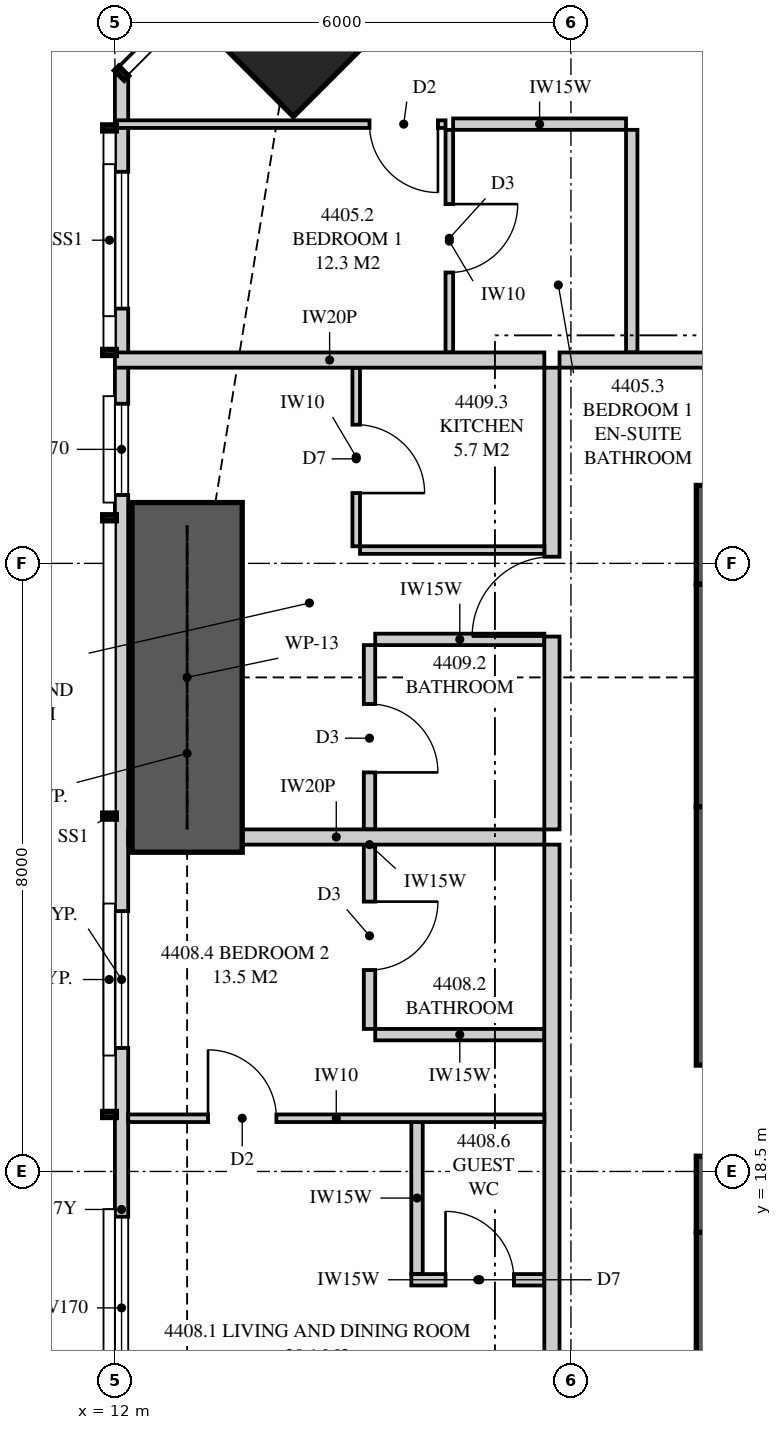
"""IFC4 building model, lengths in metres.
Left out: names, types, materials, properties, quantities, classifications, styles, units other than length and angle.
Written with IfcOpenShell. Run it as: python <this file> out.ifc"""

import sys

from ifc_helpers import new_model, si_unit, direction, frame, frame_2d, origin, origin_2d, place, context, subcontext, project, spatial, polyline, rectangle, outline, extrude, element, fill, save


model = new_model("IFC4")
c1 = context("Model", 3, precision=1e-05, world=origin(), true_north=direction((0.0, 1.0)))
c2 = subcontext(c1, "Body", "Model", "MODEL_VIEW")
j1 = project(units=[si_unit("LENGTHUNIT", "METRE"), si_unit("PLANEANGLEUNIT", "RADIAN")], contexts=[c1])
p1 = place(None, origin())
s1 = spatial("IfcSite", under=j1, at=p1, CompositionType="ELEMENT")
p2 = place(p1, origin())
s2 = spatial("IfcBuilding", under=s1, at=p2, CompositionType="ELEMENT")
p3 = place(p2, frame((0.0, 0.0, 164.4)))
s3 = spatial("IfcBuildingStorey", under=s2, at=p3, CompositionType="ELEMENT", Elevation=164.4)
p4 = place(p3, frame((14.348, 33.652, 0.0), z_axis=(0.0, 0.0, 1.0), x_axis=(0.707106781187, 0.707106781187, 0.0)))
e1 = element("IfcColumn", 1, at=p4, inside=s3, PredefinedType="COLUMN", context=c2, shape_type="SweptSolid", body=[
    extrude(rectangle(XDim=1.8, YDim=1.8, at=origin_2d()), origin(), (0.0, 0.0, 1.0), 3.35),
])
p5 = place(p3, frame((26.0, 26.875, 0.0), z_axis=(0.0, 0.0, 1.0), x_axis=(-1.0, 0.0, 0.0)))
e2 = element("IfcWall", 2, at=p5, inside=s3, PredefinedType="SHEAR", context=c2, shape_type="SweptSolid", body=[
    extrude(rectangle(XDim=6.35, YDim=1.3, at=frame_2d((3.175, 0.0))), origin(), (0.0, 0.0, 1.0), 3.35),
])
p6 = place(p5, frame((0.825, 0.0, 0.0)))
e3 = element("IfcOpeningElement", 3, at=p6, cuts=e2, PredefinedType="OPENING", context=c2, shape_type="SweptSolid", body=[
    extrude(rectangle(XDim=0.75, YDim=2.1, at=frame_2d((0.375, 1.05))), frame((0.0, 0.66, 0.0), z_axis=(0.0, -1.0, 0.0), x_axis=(1.0, 0.0, 0.0)), (0.0, 0.0, 1.0), 1.32),
])
p7 = place(p3, frame((20.0, 26.225, 0.0), z_axis=(0.0, 0.0, 1.0), x_axis=(0.0, -1.0, 0.0)))
e4 = element("IfcWall", 4, at=p7, inside=s3, PredefinedType="SHEAR", context=c2, shape_type="SweptSolid", body=[
    extrude(rectangle(XDim=2.925, YDim=0.7, at=frame_2d((1.462, 0.0))), origin(), (0.0, 0.0, 1.0), 3.35),
])
p8 = place(p3, frame((20.0, 23.3, 0.0), z_axis=(0.0, 0.0, 1.0), x_axis=(0.0, -1.0, 0.0)))
e5 = element("IfcWall", 5, at=p8, inside=s3, PredefinedType="SHEAR", context=c2, shape_type="SweptSolid", body=[
    extrude(rectangle(XDim=5.6, YDim=0.7, at=frame_2d((2.8, 0.0))), origin(), (0.0, 0.0, 1.0), 3.35),
])
p9 = place(p8, frame((3.4, 0.0, 0.0)))
e6 = element("IfcOpeningElement", 6, at=p9, cuts=e5, PredefinedType="OPENING", context=c2, shape_type="SweptSolid", body=[
    extrude(rectangle(XDim=1.2, YDim=2.2, at=frame_2d((0.6, 1.1))), frame((0.0, 0.36, 0.0), z_axis=(0.0, -1.0, 0.0), x_axis=(1.0, 0.0, 0.0)), (0.0, 0.0, 1.0), 0.72),
])
p10 = place(p3, frame((20.0, 17.7, 0.0), z_axis=(0.0, 0.0, 1.0), x_axis=(0.0, -1.0, 0.0)))
e7 = element("IfcWall", 7, at=p10, inside=s3, PredefinedType="SHEAR", context=c2, shape_type="SweptSolid", body=[
    extrude(rectangle(XDim=4.7, YDim=0.7, at=frame_2d((2.35, 0.0))), origin(), (0.0, 0.0, 1.0), 3.35),
])
p11 = place(p3, frame((12.087, 32.949, 0.0), z_axis=(0.0, 0.0, 1.0), x_axis=(0.0, -1.0, 0.0)))
e8 = element("IfcWall", 8, at=p11, inside=s3, PredefinedType="SOLIDWALL", context=c2, shape_type="SweptSolid", body=[
    extrude(outline(polyline([(0.0, 0.0), (29.897, 0.0), (29.897, 3.11), (20.191, 3.11), (20.191, 2.15), (20.051, 2.15), (20.051, 3.11), (19.949, 3.11), (19.949, 2.15), (7.949, 2.15), (7.949, 3.11), (7.823, 3.11), (7.823, 2.15), (7.73, 2.15), (7.73, 3.11), (0.0, 3.11), (0.0, 0.0)])), frame((0.0, 0.087, 0.0), z_axis=(0.0, -1.0, 0.0), x_axis=(1.0, 0.0, 0.0)), (0.0, 0.0, 1.0), 0.175),
])
p12 = place(p11, frame((1.297, 0.0, 0.4)))
e9 = element("IfcOpeningElement", 9, at=p12, cuts=e8, PredefinedType="OPENING", context=c2, shape_type="SweptSolid", body=[
    extrude(rectangle(XDim=1.8, YDim=1.7, at=frame_2d((0.9, 0.85))), frame((0.0, 0.097, 0.0), z_axis=(0.0, -1.0, 0.0), x_axis=(1.0, 0.0, 0.0)), (0.0, 0.0, 1.0), 0.195),
])
p13 = place(p11, frame((4.349, 0.0, 0.4)))
e10 = element("IfcOpeningElement", 10, at=p13, cuts=e8, PredefinedType="OPENING", context=c2, shape_type="SweptSolid", body=[
    extrude(rectangle(XDim=1.2, YDim=1.7, at=frame_2d((0.6, 0.85))), frame((0.0, 0.097, 0.0), z_axis=(0.0, -1.0, 0.0), x_axis=(1.0, 0.0, 0.0)), (0.0, 0.0, 1.0), 0.195),
])
p14 = place(p11, frame((11.024, 0.0, 0.4)))
e11 = element("IfcOpeningElement", 11, at=p14, cuts=e8, PredefinedType="OPENING", context=c2, shape_type="SweptSolid", body=[
    extrude(rectangle(XDim=1.8, YDim=1.7, at=frame_2d((0.9, 0.85))), frame((0.0, 0.097, 0.0), z_axis=(0.0, -1.0, 0.0), x_axis=(1.0, 0.0, 0.0)), (0.0, 0.0, 1.0), 0.195),
])
p15 = place(p11, frame((15.044, 0.0, 0.4)))
e12 = element("IfcOpeningElement", 12, at=p15, cuts=e8, PredefinedType="OPENING", context=c2, shape_type="SweptSolid", body=[
    extrude(rectangle(XDim=2.4, YDim=1.7, at=frame_2d((1.2, 0.85))), frame((0.0, 0.097, 0.0), z_axis=(0.0, -1.0, 0.0), x_axis=(1.0, 0.0, 0.0)), (0.0, 0.0, 1.0), 0.195),
])
p16 = place(p11, frame((22.624, 0.0, 0.0)))
e13 = element("IfcOpeningElement", 13, at=p16, cuts=e8, PredefinedType="OPENING", context=c2, shape_type="SweptSolid", body=[
    extrude(rectangle(XDim=1.8, YDim=2.1, at=frame_2d((0.9, 1.05))), frame((0.0, 0.097, 0.0), z_axis=(0.0, -1.0, 0.0), x_axis=(1.0, 0.0, 0.0)), (0.0, 0.0, 1.0), 0.195),
])
p17 = place(p11, frame((26.301, 0.0, 0.4)))
e14 = element("IfcOpeningElement", 14, at=p17, cuts=e8, PredefinedType="OPENING", context=c2, shape_type="SweptSolid", body=[
    extrude(rectangle(XDim=1.8, YDim=1.7, at=frame_2d((0.9, 0.85))), frame((0.0, 0.097, 0.0), z_axis=(0.0, -1.0, 0.0), x_axis=(1.0, 0.0, 0.0)), (0.0, 0.0, 1.0), 0.195),
])
p18 = place(p3, frame((17.85, 29.175, 0.0), z_axis=(0.0, 0.0, 1.0), x_axis=(1.0, 0.0, 0.0)))
e15 = element("IfcWall", 15, at=p18, inside=s3, PredefinedType="PARTITIONING", context=c2, shape_type="SweptSolid", body=[
    extrude(outline(polyline([(0.0, 0.0), (5.75, 0.0), (5.75, 3.11), (4.737, 3.11), (4.737, 2.541), (4.062, 2.541), (4.062, 3.11), (0.0, 3.11), (0.0, 0.0)])), frame((0.0, 0.1, 0.0), z_axis=(0.0, -1.0, 0.0), x_axis=(1.0, 0.0, 0.0)), (0.0, 0.0, 1.0), 0.2),
])
p19 = place(p18, frame((2.35, 0.0, 0.0)))
e16 = element("IfcOpeningElement", 16, at=p19, cuts=e15, PredefinedType="OPENING", context=c2, shape_type="SweptSolid", body=[
    extrude(rectangle(XDim=1.05, YDim=2.2, at=frame_2d((0.525, 1.1))), frame((0.0, 0.11, 0.0), z_axis=(0.0, -1.0, 0.0), x_axis=(1.0, 0.0, 0.0)), (0.0, 0.0, 1.0), 0.22),
])
p20 = place(p3, frame((16.4, 32.204, 0.0), z_axis=(0.0, 0.0, 1.0), x_axis=(0.0, -1.0, 0.0)))
e17 = element("IfcWall", 17, at=p20, inside=s3, PredefinedType="PARTITIONING", context=c2, shape_type="SweptSolid", body=[
    extrude(rectangle(XDim=2.929, YDim=0.1, at=frame_2d((1.464, 0.0))), origin(), (0.0, 0.0, 1.0), 3.11),
])
p21 = place(p20, frame((0.977, 0.0, 0.0)))
e18 = element("IfcOpeningElement", 18, at=p21, cuts=e17, PredefinedType="OPENING", context=c2, shape_type="SweptSolid", body=[
    extrude(rectangle(XDim=0.9, YDim=2.1, at=frame_2d((0.45, 1.05))), frame((0.0, 0.06, 0.0), z_axis=(0.0, -1.0, 0.0), x_axis=(1.0, 0.0, 0.0)), (0.0, 0.0, 1.0), 0.12),
])
p22 = place(p3, frame((16.35, 32.279, 0.0), z_axis=(0.0, 0.0, 1.0), x_axis=(-1.0, 0.0, 0.0)))
e19 = element("IfcWall", 19, at=p22, inside=s3, PredefinedType="PARTITIONING", context=c2, shape_type="SweptSolid", body=[
    extrude(outline(polyline([(0.0, 0.0), (4.35, 0.0), (4.35, 3.11), (3.094, 3.11), (3.094, 2.15), (1.352, 2.15), (1.352, 3.11), (0.0, 3.11), (0.0, 0.0)])), frame((0.0, 0.05, 0.0), z_axis=(0.0, -1.0, 0.0), x_axis=(1.0, 0.0, 0.0)), (0.0, 0.0, 1.0), 0.1),
])
p23 = place(p22, frame((0.1, 0.0, 0.0)))
e20 = element("IfcOpeningElement", 20, at=p23, cuts=e19, PredefinedType="OPENING", context=c2, shape_type="SweptSolid", body=[
    extrude(rectangle(XDim=0.9, YDim=2.1, at=frame_2d((0.45, 1.05))), frame((0.0, 0.06, 0.0), z_axis=(0.0, -1.0, 0.0), x_axis=(1.0, 0.0, 0.0)), (0.0, 0.0, 1.0), 0.12),
])
p24 = place(p3, frame((18.725, 32.279, 0.0), z_axis=(0.0, 0.0, 1.0), x_axis=(-1.0, 0.0, 0.0)))
e21 = element("IfcWall", 21, at=p24, inside=s3, PredefinedType="PLUMBINGWALL", context=c2, shape_type="SweptSolid", body=[
    extrude(rectangle(XDim=2.275, YDim=0.15, at=frame_2d((1.138, 0.0))), origin(), (0.0, 0.0, 1.0), 3.11),
])
p25 = place(p3, frame((18.8, 32.204, 0.0), z_axis=(0.0, 0.0, 1.0), x_axis=(0.0, -1.0, 0.0)))
e22 = element("IfcWall", 22, at=p25, inside=s3, PredefinedType="PLUMBINGWALL", context=c2, shape_type="SweptSolid", body=[
    extrude(rectangle(XDim=2.929, YDim=0.15, at=frame_2d((1.464, 0.0))), origin(), (0.0, 0.0, 1.0), 3.11),
])
p26 = place(p3, frame((12.0, 29.175, 0.0), z_axis=(0.0, 0.0, 1.0), x_axis=(1.0, 0.0, 0.0)))
e23 = element("IfcWall", 23, at=p26, inside=s3, PredefinedType="PARTITIONING", context=c2, shape_type="SweptSolid", body=[
    extrude(outline(polyline([(0.0, 0.0), (5.65, 0.0), (5.65, 3.11), (2.547, 3.11), (2.547, 2.15), (0.703, 2.15), (0.703, 3.11), (0.0, 3.11), (0.0, 0.0)])), frame((0.0, 0.1, 0.0), z_axis=(0.0, -1.0, 0.0), x_axis=(1.0, 0.0, 0.0)), (0.0, 0.0, 1.0), 0.2),
])
p27 = place(p3, frame((12.175, 22.9, 0.0), z_axis=(0.0, 0.0, 1.0), x_axis=(1.0, 0.0, 0.0)))
e24 = element("IfcWall", 24, at=p27, inside=s3, PredefinedType="PARTITIONING", context=c2, shape_type="SweptSolid", body=[
    extrude(outline(polyline([(0.0, 0.0), (5.475, 0.0), (5.475, 3.11), (1.685, 3.11), (1.685, 2.15), (0.0, 2.15), (0.0, 3.11), (0.0, 0.0)])), frame((0.0, 0.1, 0.0), z_axis=(0.0, -1.0, 0.0), x_axis=(1.0, 0.0, 0.0)), (0.0, 0.0, 1.0), 0.2),
])
p28 = place(p3, frame((17.75, 7.925, 0.0), z_axis=(0.0, 0.0, 1.0), x_axis=(0.0, 1.0, 0.0)))
e25 = element("IfcWall", 25, at=p28, inside=s3, PredefinedType="PARTITIONING", context=c2, shape_type="SweptSolid", body=[
    extrude(outline(polyline([(0.0, 0.0), (14.875, 0.0), (14.875, 3.11), (5.412, 3.11), (5.412, 2.541), (4.738, 2.541), (4.738, 3.11), (0.0, 3.11), (0.0, 0.0)])), frame((0.0, 0.1, 0.0), z_axis=(0.0, -1.0, 0.0), x_axis=(1.0, 0.0, 0.0)), (0.0, 0.0, 1.0), 0.2),
])
p29 = place(p28, frame((6.938, 0.0, 0.0)))
e26 = element("IfcOpeningElement", 26, at=p29, cuts=e25, PredefinedType="OPENING", context=c2, shape_type="SweptSolid", body=[
    extrude(rectangle(XDim=1.05, YDim=2.2, at=frame_2d((0.525, 1.1))), frame((0.0, 0.11, 0.0), z_axis=(0.0, -1.0, 0.0), x_axis=(1.0, 0.0, 0.0)), (0.0, 0.0, 1.0), 0.22),
])
p30 = place(p3, frame((15.35, 20.375, 0.0), z_axis=(0.0, 0.0, 1.0), x_axis=(0.0, 1.0, 0.0)))
e27 = element("IfcWall", 27, at=p30, inside=s3, PredefinedType="PLUMBINGWALL", context=c2, shape_type="SweptSolid", body=[
    extrude(rectangle(XDim=2.425, YDim=0.15, at=frame_2d((1.212, 0.0))), origin(), (0.0, 0.0, 1.0), 3.11),
])
p31 = place(p30, frame((0.775, 0.0, 0.0)))
e28 = element("IfcOpeningElement", 28, at=p31, cuts=e27, PredefinedType="OPENING", context=c2, shape_type="SweptSolid", body=[
    extrude(rectangle(XDim=0.9, YDim=2.1, at=frame_2d((0.45, 1.05))), frame((0.0, 0.085, 0.0), z_axis=(0.0, -1.0, 0.0), x_axis=(1.0, 0.0, 0.0)), (0.0, 0.0, 1.0), 0.17),
])
p32 = place(p3, frame((15.425, 20.3, 0.0), z_axis=(0.0, 0.0, 1.0), x_axis=(1.0, 0.0, 0.0)))
e29 = element("IfcWall", 29, at=p32, inside=s3, PredefinedType="PLUMBINGWALL", context=c2, shape_type="SweptSolid", body=[
    extrude(rectangle(XDim=2.225, YDim=0.15, at=frame_2d((1.112, 0.0))), origin(), (0.0, 0.0, 1.0), 3.11),
])
p33 = place(p3, frame((12.175, 19.2, 0.0), z_axis=(0.0, 0.0, 1.0), x_axis=(1.0, 0.0, 0.0)))
e30 = element("IfcWall", 30, at=p33, inside=s3, PredefinedType="PARTITIONING", context=c2, shape_type="SweptSolid", body=[
    extrude(outline(polyline([(0.0, 0.0), (5.475, 0.0), (5.475, 3.11), (1.635, 3.11), (1.635, 2.15), (0.0, 2.15), (0.0, 3.11), (0.0, 0.0)])), frame((0.0, 0.05, 0.0), z_axis=(0.0, -1.0, 0.0), x_axis=(1.0, 0.0, 0.0)), (0.0, 0.0, 1.0), 0.1),
])
p34 = place(p33, frame((1.05, 0.0, 0.0)))
e31 = element("IfcOpeningElement", 31, at=p34, cuts=e30, PredefinedType="OPENING", context=c2, shape_type="SweptSolid", body=[
    extrude(rectangle(XDim=0.9, YDim=2.1, at=frame_2d((0.45, 1.05))), frame((0.0, 0.06, 0.0), z_axis=(0.0, -1.0, 0.0), x_axis=(1.0, 0.0, 0.0)), (0.0, 0.0, 1.0), 0.12),
])
p35 = place(p3, frame((17.75, 23.0, 0.0), z_axis=(0.0, 0.0, 1.0), x_axis=(0.0, 1.0, 0.0)))
e32 = element("IfcWall", 32, at=p35, inside=s3, PredefinedType="PARTITIONING", context=c2, shape_type="SweptSolid", body=[
    extrude(outline(polyline([(0.0, 0.0), (6.075, 0.0), (6.075, 3.11), (2.337, 3.11), (2.337, 2.541), (1.663, 2.541), (1.663, 3.11), (0.0, 3.11), (0.0, 0.0)])), frame((0.0, 0.1, 0.0), z_axis=(0.0, -1.0, 0.0), x_axis=(1.0, 0.0, 0.0)), (0.0, 0.0, 1.0), 0.2),
])
p36 = place(p35, frame((2.538, 0.0, 0.0)))
e33 = element("IfcOpeningElement", 33, at=p36, cuts=e32, PredefinedType="OPENING", context=c2, shape_type="SweptSolid", body=[
    extrude(rectangle(XDim=1.05, YDim=2.2, at=frame_2d((0.525, 1.1))), frame((0.0, 0.11, 0.0), z_axis=(0.0, -1.0, 0.0), x_axis=(1.0, 0.0, 0.0)), (0.0, 0.0, 1.0), 0.22),
])
p37 = place(p3, frame((15.35, 23.0, 0.0), z_axis=(0.0, 0.0, 1.0), x_axis=(0.0, 1.0, 0.0)))
e34 = element("IfcWall", 34, at=p37, inside=s3, PredefinedType="PLUMBINGWALL", context=c2, shape_type="SweptSolid", body=[
    extrude(outline(polyline([(0.0, 0.0), (2.425, 0.0), (2.425, 3.11), (2.312, 3.11), (2.312, 2.541), (1.688, 2.541), (1.688, 3.11), (0.0, 3.11), (0.0, 0.0)])), frame((0.0, 0.075, 0.0), z_axis=(0.0, -1.0, 0.0), x_axis=(1.0, 0.0, 0.0)), (0.0, 0.0, 1.0), 0.15),
])
p38 = place(p37, frame((0.75, 0.0, 0.0)))
e35 = element("IfcOpeningElement", 35, at=p38, cuts=e34, PredefinedType="OPENING", context=c2, shape_type="SweptSolid", body=[
    extrude(rectangle(XDim=0.9, YDim=2.1, at=frame_2d((0.45, 1.05))), frame((0.0, 0.085, 0.0), z_axis=(0.0, -1.0, 0.0), x_axis=(1.0, 0.0, 0.0)), (0.0, 0.0, 1.0), 0.17),
])
p39 = place(p3, frame((15.425, 25.5, 0.0), z_axis=(0.0, 0.0, 1.0), x_axis=(1.0, 0.0, 0.0)))
e36 = element("IfcWall", 36, at=p39, inside=s3, PredefinedType="PLUMBINGWALL", context=c2, shape_type="SweptSolid", body=[
    extrude(rectangle(XDim=2.225, YDim=0.15, at=frame_2d((1.112, 0.0))), origin(), (0.0, 0.0, 1.0), 3.11),
])
p40 = place(p3, frame((15.175, 26.725, 0.0), z_axis=(0.0, 0.0, 1.0), x_axis=(0.0, 1.0, 0.0)))
e37 = element("IfcWall", 37, at=p40, inside=s3, PredefinedType="PARTITIONING", context=c2, shape_type="SweptSolid", body=[
    extrude(rectangle(XDim=2.35, YDim=0.1, at=frame_2d((1.175, 0.0))), origin(), (0.0, 0.0, 1.0), 3.11),
])
p41 = place(p40, frame((0.7, 0.0, 0.0)))
e38 = element("IfcOpeningElement", 38, at=p41, cuts=e37, PredefinedType="OPENING", context=c2, shape_type="SweptSolid", body=[
    extrude(rectangle(XDim=0.9, YDim=2.1, at=frame_2d((0.45, 1.05))), frame((0.0, 0.06, 0.0), z_axis=(0.0, -1.0, 0.0), x_axis=(1.0, 0.0, 0.0)), (0.0, 0.0, 1.0), 0.12),
])
p42 = place(p3, frame((15.225, 26.675, 0.0), z_axis=(0.0, 0.0, 1.0), x_axis=(1.0, 0.0, 0.0)))
e39 = element("IfcWall", 39, at=p42, inside=s3, PredefinedType="PARTITIONING", context=c2, shape_type="SweptSolid", body=[
    extrude(rectangle(XDim=2.425, YDim=0.1, at=frame_2d((1.212, 0.0))), origin(), (0.0, 0.0, 1.0), 3.11),
])
p43 = place(p3, frame((17.65, 17.075, 0.0), z_axis=(0.0, 0.0, 1.0), x_axis=(-1.0, 0.0, 0.0)))
e40 = element("IfcWall", 40, at=p43, inside=s3, PredefinedType="PLUMBINGWALL", context=c2, shape_type="SweptSolid", body=[
    extrude(rectangle(XDim=1.75, YDim=0.15, at=frame_2d((0.875, 0.0))), origin(), (0.0, 0.0, 1.0), 3.11),
])
p44 = place(p43, frame((0.4, 0.0, 0.0)))
e41 = element("IfcOpeningElement", 41, at=p44, cuts=e40, PredefinedType="OPENING", context=c2, shape_type="SweptSolid", body=[
    extrude(rectangle(XDim=0.9, YDim=2.1, at=frame_2d((0.45, 1.05))), frame((0.0, 0.085, 0.0), z_axis=(0.0, -1.0, 0.0), x_axis=(1.0, 0.0, 0.0)), (0.0, 0.0, 1.0), 0.17),
])
p45 = place(p3, frame((15.975, 19.15, 0.0), z_axis=(0.0, 0.0, 1.0), x_axis=(0.0, -1.0, 0.0)))
e42 = element("IfcWall", 42, at=p45, inside=s3, PredefinedType="PLUMBINGWALL", context=c2, shape_type="SweptSolid", body=[
    extrude(rectangle(XDim=2.0, YDim=0.15, at=frame_2d((1.0, 0.0))), origin(), (0.0, 0.0, 1.0), 3.11),
])
p46 = place(p3, frame((12.95, 22.7, 0.0), z_axis=(0.0, 0.0, 1.0), x_axis=(0.0, 1.0, 0.0)))
e43 = element("IfcWall", 43, at=p46, inside=s3, PredefinedType="SHEAR", context=c2, shape_type="SweptSolid", body=[
    extrude(rectangle(XDim=4.6, YDim=1.45, at=frame_2d((2.3, 0.0))), origin(), (0.0, 0.0, 1.0), 3.35),
])
p47 = place(p12, origin())
e44 = element("IfcWindow", 44, at=p47, inside=s3, PartitioningType="SINGLE_PANEL", PredefinedType="WINDOW", context=c2, shape_type="SweptSolid", body=[
    extrude(rectangle(XDim=1.8, YDim=1.7, at=frame_2d((0.9, 0.85))), frame((0.0, 0.03, 0.0), z_axis=(0.0, -1.0, 0.0), x_axis=(1.0, 0.0, 0.0)), (0.0, 0.0, 1.0), 0.06),
])
fill(e9, e44)
p48 = place(p13, origin())
e45 = element("IfcWindow", 45, at=p48, inside=s3, PartitioningType="SINGLE_PANEL", PredefinedType="WINDOW", context=c2, shape_type="SweptSolid", body=[
    extrude(rectangle(XDim=1.2, YDim=1.7, at=frame_2d((0.6, 0.85))), frame((0.0, 0.03, 0.0), z_axis=(0.0, -1.0, 0.0), x_axis=(1.0, 0.0, 0.0)), (0.0, 0.0, 1.0), 0.06),
])
fill(e10, e45)
p49 = place(p14, origin())
e46 = element("IfcWindow", 46, at=p49, inside=s3, PartitioningType="SINGLE_PANEL", PredefinedType="WINDOW", context=c2, shape_type="SweptSolid", body=[
    extrude(rectangle(XDim=1.8, YDim=1.7, at=frame_2d((0.9, 0.85))), frame((0.0, 0.03, 0.0), z_axis=(0.0, -1.0, 0.0), x_axis=(1.0, 0.0, 0.0)), (0.0, 0.0, 1.0), 0.06),
])
fill(e11, e46)
p50 = place(p15, origin())
e47 = element("IfcWindow", 47, at=p50, inside=s3, PartitioningType="SINGLE_PANEL", PredefinedType="WINDOW", context=c2, shape_type="SweptSolid", body=[
    extrude(rectangle(XDim=2.4, YDim=1.7, at=frame_2d((1.2, 0.85))), frame((0.0, 0.03, 0.0), z_axis=(0.0, -1.0, 0.0), x_axis=(1.0, 0.0, 0.0)), (0.0, 0.0, 1.0), 0.06),
])
fill(e12, e47)
p51 = place(p23, origin())
e48 = element("IfcDoor", 48, at=p51, inside=s3, OperationType="SINGLE_SWING_LEFT", PredefinedType="DOOR", context=c2, shape_type="SweptSolid", body=[
    extrude(rectangle(XDim=0.9, YDim=2.1, at=frame_2d((0.45, 1.05))), frame((0.0, 0.025, 0.0), z_axis=(0.0, -1.0, 0.0), x_axis=(1.0, 0.0, 0.0)), (0.0, 0.0, 1.0), 0.05),
])
fill(e20, e48)
p52 = place(p21, origin())
e49 = element("IfcDoor", 49, at=p52, inside=s3, OperationType="SINGLE_SWING_LEFT", PredefinedType="DOOR", context=c2, shape_type="SweptSolid", body=[
    extrude(rectangle(XDim=0.9, YDim=2.1, at=frame_2d((0.45, 1.05))), frame((0.0, 0.025, 0.0), z_axis=(0.0, -1.0, 0.0), x_axis=(1.0, 0.0, 0.0)), (0.0, 0.0, 1.0), 0.05),
])
fill(e18, e49)
p53 = place(p31, frame((0.9, 0.0, 0.0), z_axis=(0.0, 0.0, 1.0), x_axis=(-1.0, 0.0, 0.0)))
e50 = element("IfcDoor", 50, at=p53, inside=s3, OperationType="SINGLE_SWING_LEFT", PredefinedType="DOOR", context=c2, shape_type="SweptSolid", body=[
    extrude(rectangle(XDim=0.9, YDim=2.1, at=frame_2d((0.45, 1.05))), frame((0.0, 0.025, 0.0), z_axis=(0.0, -1.0, 0.0), x_axis=(1.0, 0.0, 0.0)), (0.0, 0.0, 1.0), 0.05),
])
fill(e28, e50)
p54 = place(p34, origin())
e51 = element("IfcDoor", 51, at=p54, inside=s3, OperationType="SINGLE_SWING_LEFT", PredefinedType="DOOR", context=c2, shape_type="SweptSolid", body=[
    extrude(rectangle(XDim=0.9, YDim=2.1, at=frame_2d((0.45, 1.05))), frame((0.0, 0.025, 0.0), z_axis=(0.0, -1.0, 0.0), x_axis=(1.0, 0.0, 0.0)), (0.0, 0.0, 1.0), 0.05),
])
fill(e31, e51)
p55 = place(p36, origin())
e52 = element("IfcDoor", 52, at=p55, inside=s3, OperationType="SINGLE_SWING_LEFT", PredefinedType="DOOR", context=c2, shape_type="SweptSolid", body=[
    extrude(rectangle(XDim=1.05, YDim=2.2, at=frame_2d((0.525, 1.1))), frame((0.0, 0.025, 0.0), z_axis=(0.0, -1.0, 0.0), x_axis=(1.0, 0.0, 0.0)), (0.0, 0.0, 1.0), 0.05),
])
fill(e33, e52)
p56 = place(p38, frame((0.9, 0.0, 0.0), z_axis=(0.0, 0.0, 1.0), x_axis=(-1.0, 0.0, 0.0)))
e53 = element("IfcDoor", 53, at=p56, inside=s3, OperationType="SINGLE_SWING_RIGHT", PredefinedType="DOOR", context=c2, shape_type="SweptSolid", body=[
    extrude(rectangle(XDim=0.9, YDim=2.1, at=frame_2d((0.45, 1.05))), frame((0.0, 0.025, 0.0), z_axis=(0.0, -1.0, 0.0), x_axis=(1.0, 0.0, 0.0)), (0.0, 0.0, 1.0), 0.05),
])
fill(e35, e53)
p57 = place(p41, frame((0.9, 0.0, 0.0), z_axis=(0.0, 0.0, 1.0), x_axis=(-1.0, 0.0, 0.0)))
e54 = element("IfcDoor", 54, at=p57, inside=s3, OperationType="SINGLE_SWING_RIGHT", PredefinedType="DOOR", context=c2, shape_type="SweptSolid", body=[
    extrude(rectangle(XDim=0.9, YDim=2.1, at=frame_2d((0.45, 1.05))), frame((0.0, 0.025, 0.0), z_axis=(0.0, -1.0, 0.0), x_axis=(1.0, 0.0, 0.0)), (0.0, 0.0, 1.0), 0.05),
])
fill(e38, e54)
p58 = place(p44, frame((0.9, 0.0, 0.0), z_axis=(0.0, 0.0, 1.0), x_axis=(-1.0, 0.0, 0.0)))
e55 = element("IfcDoor", 55, at=p58, inside=s3, OperationType="SINGLE_SWING_LEFT", PredefinedType="DOOR", context=c2, shape_type="SweptSolid", body=[
    extrude(rectangle(XDim=0.9, YDim=2.1, at=frame_2d((0.45, 1.05))), frame((0.0, 0.025, 0.0), z_axis=(0.0, -1.0, 0.0), x_axis=(1.0, 0.0, 0.0)), (0.0, 0.0, 1.0), 0.05),
])
fill(e41, e55)
save(model, sys.argv[1])
